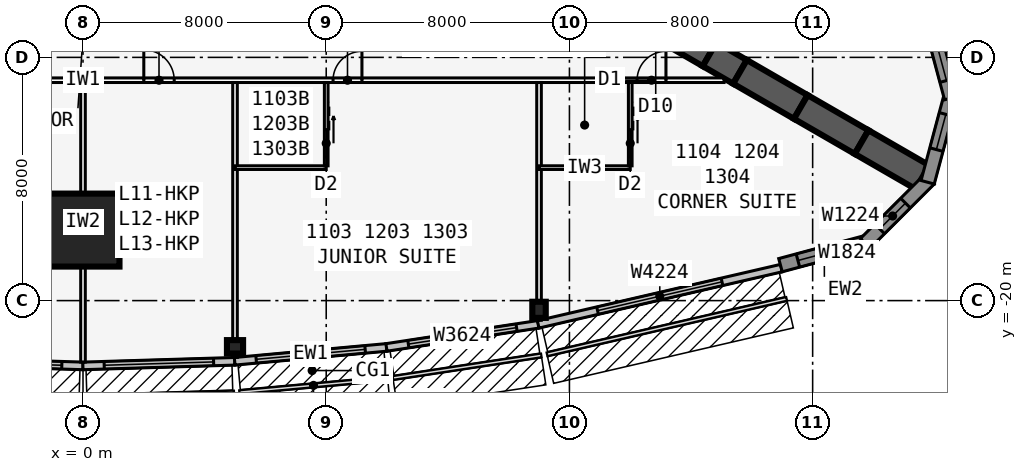
"""IFC4 building model, lengths in metres.
Left out: names, types, materials, properties, quantities, classifications, styles, units other than length and angle.
Written with IfcOpenShell. Run it as: python <this file> out.ifc"""

import sys

from ifc_helpers import new_model, si_unit, direction, frame, frame_2d, origin, origin_2d, place, context, subcontext, project, spatial, polyline, rectangle, i_section, outline, extrude, element, fill, save


model = new_model("IFC4")
c1 = context("Model", 3, precision=1e-05, world=origin(), true_north=direction((0.0, 1.0)))
c2 = subcontext(c1, "Body", "Model", "MODEL_VIEW")
j1 = project(units=[si_unit("LENGTHUNIT", "METRE"), si_unit("PLANEANGLEUNIT", "RADIAN")], contexts=[c1])
p1 = place(None, origin())
s1 = spatial("IfcSite", under=j1, at=p1, CompositionType="ELEMENT")
p2 = place(p1, origin())
s2 = spatial("IfcBuilding", under=s1, at=p2, CompositionType="ELEMENT")
p3 = place(p2, frame((0.0, 0.0, 48.9)))
s3 = spatial("IfcBuildingStorey", under=s2, at=p3, CompositionType="ELEMENT", Elevation=48.9)
p4 = place(p3, frame((16.5, -9.526, 0.0), z_axis=(0.0, 0.0, 1.0), x_axis=(0.866031398331, -0.499989616998, 0.0)))
e1 = element("IfcWall", 1, at=p4, inside=s3, PredefinedType="SHEAR", context=c2, shape_type="SweptSolid", body=[
    extrude(rectangle(XDim=4.746, YDim=0.9, at=frame_2d((2.373, 0.0))), origin(), (0.0, 0.0, 1.0), 3.4),
])
p5 = place(p4, frame((1.8, 0.0, 0.0)))
e2 = element("IfcOpeningElement", 2, at=p5, cuts=e1, PredefinedType="OPENING", context=c2, shape_type="SweptSolid", body=[
    extrude(rectangle(XDim=1.8, YDim=2.13, at=frame_2d((0.9, 1.065))), frame((0.0, 0.46, 0.0), z_axis=(0.0, -1.0, 0.0), x_axis=(1.0, 0.0, 0.0)), (0.0, 0.0, 1.0), 0.92),
])
p6 = place(p3, frame((20.61, -11.899, 0.0), z_axis=(0.0, 0.0, 1.0), x_axis=(0.866009537788, -0.500027479704, 0.0)))
e3 = element("IfcWall", 3, at=p6, inside=s3, PredefinedType="SHEAR", context=c2, shape_type="SweptSolid", body=[
    extrude(rectangle(XDim=1.155, YDim=0.9, at=frame_2d((0.577, 0.0))), origin(), (0.0, 0.0, 1.0), 3.4),
])
for number, where, z_axis, x_axis in (
    (4, (21.61, -12.477, 0.0), (0.0, 0.0, 1.0), (0.866, -0.5, 0.0)),
    (5, (23.61, -13.631, 0.0), (0.0, 0.0, 1.0), (0.866, -0.5, 0.0)),
    (6, (25.61, -14.786, 0.0), (0.0, 0.0, 1.0), (0.866, -0.5, 0.0)),
):
    element("IfcWall", number, at=place(p3, frame(where, z_axis=z_axis, x_axis=x_axis)), inside=s3, PredefinedType="SHEAR", context=c2, shape_type="SweptSolid", body=[
        extrude(rectangle(XDim=2.309, YDim=0.9, at=frame_2d((1.155, 0.0))), origin(), (0.0, 0.0, 1.0), 3.4),
    ])
for number, where, z_axis, x_axis in (
    (7, (5.0, -21.521, 0.0), (0.0, 0.0, 1.0), (0.0, -1.0, 0.0)),
    (8, (15.0, -20.303, 0.0), (0.0, 0.0, 1.0), (1.0, 0.0, 0.0)),
):
    element("IfcColumn", number, at=place(p3, frame(where, z_axis=z_axis, x_axis=x_axis)), inside=s3, PredefinedType="COLUMN", context=c2, shape_type="SweptSolid", body=[
        extrude(i_section(OverallWidth=0.442, OverallDepth=0.531, WebThickness=0.066, FlangeThickness=0.106, at=origin_2d()), origin(), (0.0, 0.0, 1.0), 3.4),
    ])
p7 = place(p3, frame((0.0, -17.68, 0.0), z_axis=(0.0, 0.0, 1.0), x_axis=(0.0, -1.0, 0.0)))
e9 = element("IfcColumn", 9, at=p7, inside=s3, PredefinedType="COLUMN", context=c2, shape_type="SweptSolid", body=[
    extrude(rectangle(XDim=2.4, YDim=2.4, at=origin_2d()), origin(), (0.0, 0.0, 1.0), 3.4),
])
p8 = place(p3, frame((-4.996, -21.996, 0.0), z_axis=(0.0, 0.0, 1.0), x_axis=(0.999537635046, -0.030405856769, 0.0)))
e10 = element("IfcWall", 10, at=p8, inside=s3, PredefinedType="STANDARD", context=c2, shape_type="SweptSolid", body=[
    extrude(rectangle(XDim=5.002, YDim=0.25, at=frame_2d((2.501, 0.0))), origin(), (0.0, 0.0, 1.0), 3.235),
])
p9 = place(p8, frame((0.701, 0.0, 0.45)))
e11 = element("IfcOpeningElement", 11, at=p9, cuts=e10, PredefinedType="OPENING", context=c2, shape_type="SweptSolid", body=[
    extrude(rectangle(XDim=3.6, YDim=2.4, at=frame_2d((1.8, 1.2))), frame((0.0, 0.135, 0.0), z_axis=(0.0, -1.0, 0.0), x_axis=(1.0, 0.0, 0.0)), (0.0, 0.0, 1.0), 0.27),
])
p10 = place(p3, frame((-0.004, -22.148, 0.0), z_axis=(0.0, 0.0, 1.0), x_axis=(0.999537635046, 0.030405856769, 0.0)))
e12 = element("IfcWall", 12, at=p10, inside=s3, PredefinedType="STANDARD", context=c2, shape_type="SweptSolid", body=[
    extrude(rectangle(XDim=5.002, YDim=0.25, at=frame_2d((2.501, 0.0))), origin(), (0.0, 0.0, 1.0), 3.235),
])
p11 = place(p10, frame((0.701, 0.0, 0.45)))
e13 = element("IfcOpeningElement", 13, at=p11, cuts=e12, PredefinedType="OPENING", context=c2, shape_type="SweptSolid", body=[
    extrude(rectangle(XDim=3.6, YDim=2.4, at=frame_2d((1.8, 1.2))), frame((0.0, 0.135, 0.0), z_axis=(0.0, -1.0, 0.0), x_axis=(1.0, 0.0, 0.0)), (0.0, 0.0, 1.0), 0.27),
])
p12 = place(p3, frame((4.989, -21.996, 0.0), z_axis=(0.0, 0.0, 1.0), x_axis=(0.995857256774, 0.090930325692, 0.0)))
e14 = element("IfcWall", 14, at=p12, inside=s3, PredefinedType="STANDARD", context=c2, shape_type="SweptSolid", body=[
    extrude(rectangle(XDim=5.021, YDim=0.25, at=frame_2d((2.51, 0.0))), origin(), (0.0, 0.0, 1.0), 3.235),
])
p13 = place(p12, frame((0.71, 0.0, 0.45)))
e15 = element("IfcOpeningElement", 15, at=p13, cuts=e14, PredefinedType="OPENING", context=c2, shape_type="SweptSolid", body=[
    extrude(rectangle(XDim=3.6, YDim=2.4, at=frame_2d((1.8, 1.2))), frame((0.0, 0.135, 0.0), z_axis=(0.0, -1.0, 0.0), x_axis=(1.0, 0.0, 0.0)), (0.0, 0.0, 1.0), 0.27),
])
p14 = place(p3, frame((9.981, -21.54, 0.0), z_axis=(0.0, 0.0, 1.0), x_axis=(0.988615403399, 0.150464561152, 0.0)))
e16 = element("IfcWall", 16, at=p14, inside=s3, PredefinedType="STANDARD", context=c2, shape_type="SweptSolid", body=[
    extrude(rectangle(XDim=5.058, YDim=0.25, at=frame_2d((2.529, 0.0))), origin(), (0.0, 0.0, 1.0), 3.235),
])
p15 = place(p14, frame((0.729, 0.0, 0.45)))
e17 = element("IfcOpeningElement", 17, at=p15, cuts=e16, PredefinedType="OPENING", context=c2, shape_type="SweptSolid", body=[
    extrude(rectangle(XDim=3.6, YDim=2.4, at=frame_2d((1.8, 1.2))), frame((0.0, 0.135, 0.0), z_axis=(0.0, -1.0, 0.0), x_axis=(1.0, 0.0, 0.0)), (0.0, 0.0, 1.0), 0.27),
])
p16 = place(p3, frame((14.972, -20.781, 0.0), z_axis=(0.0, 0.0, 1.0), x_axis=(0.974279327392, 0.225343720163, 0.0)))
e18 = element("IfcWall", 18, at=p16, inside=s3, PredefinedType="STANDARD", context=c2, shape_type="SweptSolid", body=[
    extrude(rectangle(XDim=8.211, YDim=0.25, at=frame_2d((4.105, 0.0))), origin(), (0.0, 0.0, 1.0), 3.235),
])
p17 = place(p16, frame((2.006, 0.0, 0.45)))
e19 = element("IfcOpeningElement", 19, at=p17, cuts=e18, PredefinedType="OPENING", context=c2, shape_type="SweptSolid", body=[
    extrude(rectangle(XDim=4.2, YDim=2.4, at=frame_2d((2.1, 1.2))), frame((0.0, 0.135, 0.0), z_axis=(0.0, -1.0, 0.0), x_axis=(1.0, 0.0, 0.0)), (0.0, 0.0, 1.0), 0.27),
])
p18 = place(p3, frame((22.942, -18.835, 0.0), z_axis=(0.0, 0.0, 1.0), x_axis=(0.965930548995, 0.258801419081, 0.0)))
e20 = element("IfcWall", 20, at=p18, inside=s3, PredefinedType="SOLIDWALL", context=c2, shape_type="SweptSolid", body=[
    extrude(rectangle(XDim=2.989, YDim=0.45, at=frame_2d((1.494, 0.0))), origin(), (0.0, 0.0, 1.0), 3.235),
])
p19 = place(p18, frame((0.594, 0.0, 0.45)))
e21 = element("IfcOpeningElement", 21, at=p19, cuts=e20, PredefinedType="OPENING", context=c2, shape_type="SweptSolid", body=[
    extrude(rectangle(XDim=1.8, YDim=2.4, at=frame_2d((0.9, 1.2))), frame((0.0, 0.235, 0.0), z_axis=(0.0, -1.0, 0.0), x_axis=(1.0, 0.0, 0.0)), (0.0, 0.0, 1.0), 0.47),
])
p20 = place(p3, frame((25.728, -18.12, 0.0), z_axis=(0.0, 0.0, 1.0), x_axis=(0.707025086683, 0.707188466253, 0.0)))
e22 = element("IfcWall", 22, at=p20, inside=s3, PredefinedType="SOLIDWALL", context=c2, shape_type="SweptSolid", body=[
    extrude(outline(polyline([(2.989, 0.225), (2.93, 0.225), (2.438, 0.093), (2.402, 0.225), (0.0, 0.225), (0.0, -0.225), (2.989, -0.225), (2.989, 0.225)])), origin(), (0.0, 0.0, 1.0), 3.235),
])
p21 = place(p20, frame((0.676, 0.0, 0.45)))
e23 = element("IfcOpeningElement", 23, at=p21, cuts=e22, PredefinedType="OPENING", context=c2, shape_type="SweptSolid", body=[
    extrude(rectangle(XDim=1.2, YDim=2.4, at=frame_2d((0.6, 1.2))), frame((0.0, 0.235, 0.0), z_axis=(0.0, -1.0, 0.0), x_axis=(1.0, 0.0, 0.0)), (0.0, 0.0, 1.0), 0.47),
])
p22 = place(p3, frame((27.783, -16.108, 0.0), z_axis=(0.0, 0.0, 1.0), x_axis=(0.258801419081, 0.965930548995, 0.0)))
e24 = element("IfcWall", 24, at=p22, inside=s3, PredefinedType="SOLIDWALL", context=c2, shape_type="SweptSolid", body=[
    extrude(outline(polyline([(2.989, 0.225), (0.586, 0.225), (0.551, 0.093), (0.06, 0.225), (0.0, 0.225), (0.0, -0.225), (2.989, -0.225), (2.989, 0.225)])), origin(), (0.0, 0.0, 1.0), 3.235),
])
p23 = place(p22, frame((1.113, 0.0, 0.45)))
e25 = element("IfcOpeningElement", 25, at=p23, cuts=e24, PredefinedType="OPENING", context=c2, shape_type="SweptSolid", body=[
    extrude(rectangle(XDim=1.2, YDim=2.4, at=frame_2d((0.6, 1.2))), frame((0.0, 0.235, 0.0), z_axis=(0.0, -1.0, 0.0), x_axis=(1.0, 0.0, 0.0)), (0.0, 0.0, 1.0), 0.47),
])
p24 = place(p3, frame((28.556, -13.337, 0.0), z_axis=(0.0, 0.0, 1.0), x_axis=(-0.258780998834, 0.965936019953, 0.0)))
e26 = element("IfcWall", 26, at=p24, inside=s3, PredefinedType="SOLIDWALL", context=c2, shape_type="SweptSolid", body=[
    extrude(rectangle(XDim=2.989, YDim=0.45, at=frame_2d((1.494, 0.0))), origin(), (0.0, 0.0, 1.0), 3.235),
])
p25 = place(p24, frame((0.594, 0.0, 0.45)))
e27 = element("IfcOpeningElement", 27, at=p25, cuts=e26, PredefinedType="OPENING", context=c2, shape_type="SweptSolid", body=[
    extrude(rectangle(XDim=1.8, YDim=2.4, at=frame_2d((0.9, 1.2))), frame((0.0, 0.235, 0.0), z_axis=(0.0, -1.0, 0.0), x_axis=(1.0, 0.0, 0.0)), (0.0, 0.0, 1.0), 0.47),
])
p26 = place(p3, frame((-21.086, -12.751, 0.0), z_axis=(0.0, 0.0, 1.0), x_axis=(1.0, 0.0, 0.0)))
e28 = element("IfcWall", 28, at=p26, inside=s3, PredefinedType="PARTITIONING", context=c2, shape_type="SweptSolid", body=[
    extrude(rectangle(XDim=42.172, YDim=0.15, at=frame_2d((21.086, 0.0))), origin(), (0.0, 0.0, 1.0), 3.235),
])
p27 = place(p26, frame((2.338, 0.0, 0.0)))
e29 = element("IfcOpeningElement", 29, at=p27, cuts=e28, PredefinedType="OPENING", context=c2, shape_type="SweptSolid", body=[
    extrude(rectangle(XDim=0.95, YDim=2.13, at=frame_2d((0.475, 1.065))), frame((0.0, 0.085, 0.0), z_axis=(0.0, -1.0, 0.0), x_axis=(1.0, 0.0, 0.0)), (0.0, 0.0, 1.0), 0.17),
])
p28 = place(p26, frame((14.311, 0.0, 0.0)))
e30 = element("IfcOpeningElement", 30, at=p28, cuts=e28, PredefinedType="OPENING", context=c2, shape_type="SweptSolid", body=[
    extrude(rectangle(XDim=0.95, YDim=2.13, at=frame_2d((0.475, 1.065))), frame((0.0, 0.085, 0.0), z_axis=(0.0, -1.0, 0.0), x_axis=(1.0, 0.0, 0.0)), (0.0, 0.0, 1.0), 0.17),
])
p29 = place(p26, frame((23.086, 0.0, 0.0)))
e31 = element("IfcOpeningElement", 31, at=p29, cuts=e28, PredefinedType="OPENING", context=c2, shape_type="SweptSolid", body=[
    extrude(rectangle(XDim=1.0, YDim=2.13, at=frame_2d((0.5, 1.065))), frame((0.0, 0.085, 0.0), z_axis=(0.0, -1.0, 0.0), x_axis=(1.0, 0.0, 0.0)), (0.0, 0.0, 1.0), 0.17),
])
p30 = place(p26, frame((29.311, 0.0, 0.0)))
e32 = element("IfcOpeningElement", 32, at=p30, cuts=e28, PredefinedType="OPENING", context=c2, shape_type="SweptSolid", body=[
    extrude(rectangle(XDim=0.95, YDim=2.13, at=frame_2d((0.475, 1.065))), frame((0.0, 0.085, 0.0), z_axis=(0.0, -1.0, 0.0), x_axis=(1.0, 0.0, 0.0)), (0.0, 0.0, 1.0), 0.17),
])
p31 = place(p26, frame((39.311, 0.0, 0.0)))
e33 = element("IfcOpeningElement", 33, at=p31, cuts=e28, PredefinedType="OPENING", context=c2, shape_type="SweptSolid", body=[
    extrude(rectangle(XDim=0.95, YDim=2.13, at=frame_2d((0.475, 1.065))), frame((0.0, 0.085, 0.0), z_axis=(0.0, -1.0, 0.0), x_axis=(1.0, 0.0, 0.0)), (0.0, 0.0, 1.0), 0.17),
])
p32 = place(p3, frame((0.0, -12.826, 0.0), z_axis=(0.0, 0.0, 1.0), x_axis=(0.0, -1.0, 0.0)))
e34 = element("IfcWall", 34, at=p32, inside=s3, PredefinedType="PARTITIONING", context=c2, shape_type="SweptSolid", body=[
    extrude(rectangle(XDim=9.196, YDim=0.15, at=frame_2d((4.598, 0.0))), origin(), (0.0, 0.0, 1.0), 2.389),
])
p33 = place(p3, frame((5.0, -12.826, 0.0), z_axis=(0.0, 0.0, 1.0), x_axis=(0.0, -1.0, 0.0)))
e35 = element("IfcWall", 35, at=p33, inside=s3, PredefinedType="PARTITIONING", context=c2, shape_type="SweptSolid", body=[
    extrude(rectangle(XDim=9.043, YDim=0.15, at=frame_2d((4.521, 0.0))), origin(), (0.0, 0.0, 1.0), 2.389),
])
p34 = place(p3, frame((15.0, -12.826, 0.0), z_axis=(0.0, 0.0, 1.0), x_axis=(0.0, -1.0, 0.0)))
e36 = element("IfcWall", 36, at=p34, inside=s3, PredefinedType="PARTITIONING", context=c2, shape_type="SweptSolid", body=[
    extrude(rectangle(XDim=7.82, YDim=0.15, at=frame_2d((3.91, 0.0))), origin(), (0.0, 0.0, 1.0), 2.389),
])
p35 = place(p3, frame((5.0, -15.626, 0.0), z_axis=(0.0, 0.0, 1.0), x_axis=(1.0, 0.0, 0.0)))
e37 = element("IfcWall", 37, at=p35, inside=s3, PredefinedType="PLUMBINGWALL", context=c2, shape_type="SweptSolid", body=[
    extrude(rectangle(XDim=3.0, YDim=0.12, at=frame_2d((1.5, 0.0))), origin(), (0.0, 0.0, 1.0), 3.235),
])
p36 = place(p3, frame((8.0, -12.826, 0.0), z_axis=(0.0, 0.0, 1.0), x_axis=(0.0, -1.0, 0.0)))
e38 = element("IfcWall", 38, at=p36, inside=s3, PredefinedType="PLUMBINGWALL", context=c2, shape_type="SweptSolid", body=[
    extrude(rectangle(XDim=2.74, YDim=0.12, at=frame_2d((1.37, 0.0))), origin(), (0.0, 0.0, 1.0), 3.235),
])
p37 = place(p36, frame((1.55, 0.0, 0.0)))
e39 = element("IfcOpeningElement", 39, at=p37, cuts=e38, PredefinedType="OPENING", context=c2, shape_type="SweptSolid", body=[
    extrude(rectangle(XDim=0.9, YDim=2.13, at=frame_2d((0.45, 1.065))), frame((0.0, 0.07, 0.0), z_axis=(0.0, -1.0, 0.0), x_axis=(1.0, 0.0, 0.0)), (0.0, 0.0, 1.0), 0.14),
])
p38 = place(p3, frame((15.0, -15.626, 0.0), z_axis=(0.0, 0.0, 1.0), x_axis=(1.0, 0.0, 0.0)))
e40 = element("IfcWall", 40, at=p38, inside=s3, PredefinedType="PLUMBINGWALL", context=c2, shape_type="SweptSolid", body=[
    extrude(rectangle(XDim=3.0, YDim=0.12, at=frame_2d((1.5, 0.0))), origin(), (0.0, 0.0, 1.0), 3.235),
])
p39 = place(p3, frame((18.0, -12.826, 0.0), z_axis=(0.0, 0.0, 1.0), x_axis=(0.0, -1.0, 0.0)))
e41 = element("IfcWall", 41, at=p39, inside=s3, PredefinedType="PLUMBINGWALL", context=c2, shape_type="SweptSolid", body=[
    extrude(rectangle(XDim=2.74, YDim=0.12, at=frame_2d((1.37, 0.0))), origin(), (0.0, 0.0, 1.0), 3.235),
])
p40 = place(p39, frame((1.55, 0.0, 0.0)))
e42 = element("IfcOpeningElement", 42, at=p40, cuts=e41, PredefinedType="OPENING", context=c2, shape_type="SweptSolid", body=[
    extrude(rectangle(XDim=0.9, YDim=2.13, at=frame_2d((0.45, 1.065))), frame((0.0, 0.07, 0.0), z_axis=(0.0, -1.0, 0.0), x_axis=(1.0, 0.0, 0.0)), (0.0, 0.0, 1.0), 0.14),
])
p41 = place(p9, origin())
e43 = element("IfcWindow", 43, at=p41, inside=s3, PartitioningType="SINGLE_PANEL", PredefinedType="WINDOW", context=c2, shape_type="SweptSolid", body=[
    extrude(rectangle(XDim=3.6, YDim=2.4, at=frame_2d((1.8, 1.2))), frame((0.0, 0.03, 0.0), z_axis=(0.0, -1.0, 0.0), x_axis=(1.0, 0.0, 0.0)), (0.0, 0.0, 1.0), 0.06),
])
fill(e11, e43)
p42 = place(p11, origin())
e44 = element("IfcWindow", 44, at=p42, inside=s3, PartitioningType="SINGLE_PANEL", PredefinedType="WINDOW", context=c2, shape_type="SweptSolid", body=[
    extrude(rectangle(XDim=3.6, YDim=2.4, at=frame_2d((1.8, 1.2))), frame((0.0, 0.03, 0.0), z_axis=(0.0, -1.0, 0.0), x_axis=(1.0, 0.0, 0.0)), (0.0, 0.0, 1.0), 0.06),
])
fill(e13, e44)
p43 = place(p13, origin())
e45 = element("IfcWindow", 45, at=p43, inside=s3, PartitioningType="SINGLE_PANEL", PredefinedType="WINDOW", context=c2, shape_type="SweptSolid", body=[
    extrude(rectangle(XDim=3.6, YDim=2.4, at=frame_2d((1.8, 1.2))), frame((0.0, 0.03, 0.0), z_axis=(0.0, -1.0, 0.0), x_axis=(1.0, 0.0, 0.0)), (0.0, 0.0, 1.0), 0.06),
])
fill(e15, e45)
p44 = place(p15, origin())
e46 = element("IfcWindow", 46, at=p44, inside=s3, PartitioningType="SINGLE_PANEL", PredefinedType="WINDOW", context=c2, shape_type="SweptSolid", body=[
    extrude(rectangle(XDim=3.6, YDim=2.4, at=frame_2d((1.8, 1.2))), frame((0.0, 0.03, 0.0), z_axis=(0.0, -1.0, 0.0), x_axis=(1.0, 0.0, 0.0)), (0.0, 0.0, 1.0), 0.06),
])
fill(e17, e46)
p45 = place(p17, origin())
e47 = element("IfcWindow", 47, at=p45, inside=s3, PartitioningType="SINGLE_PANEL", PredefinedType="WINDOW", context=c2, shape_type="SweptSolid", body=[
    extrude(rectangle(XDim=4.2, YDim=2.4, at=frame_2d((2.1, 1.2))), frame((0.0, 0.03, 0.0), z_axis=(0.0, -1.0, 0.0), x_axis=(1.0, 0.0, 0.0)), (0.0, 0.0, 1.0), 0.06),
])
fill(e19, e47)
p46 = place(p19, origin())
e48 = element("IfcWindow", 48, at=p46, inside=s3, PartitioningType="SINGLE_PANEL", PredefinedType="WINDOW", context=c2, shape_type="SweptSolid", body=[
    extrude(rectangle(XDim=1.8, YDim=2.4, at=frame_2d((0.9, 1.2))), frame((0.0, 0.03, 0.0), z_axis=(0.0, -1.0, 0.0), x_axis=(1.0, 0.0, 0.0)), (0.0, 0.0, 1.0), 0.06),
])
fill(e21, e48)
p47 = place(p21, origin())
e49 = element("IfcWindow", 49, at=p47, inside=s3, PartitioningType="SINGLE_PANEL", PredefinedType="WINDOW", context=c2, shape_type="SweptSolid", body=[
    extrude(rectangle(XDim=1.2, YDim=2.4, at=frame_2d((0.6, 1.2))), frame((0.0, 0.03, 0.0), z_axis=(0.0, -1.0, 0.0), x_axis=(1.0, 0.0, 0.0)), (0.0, 0.0, 1.0), 0.06),
])
fill(e23, e49)
p48 = place(p23, origin())
e50 = element("IfcWindow", 50, at=p48, inside=s3, PartitioningType="SINGLE_PANEL", PredefinedType="WINDOW", context=c2, shape_type="SweptSolid", body=[
    extrude(rectangle(XDim=1.2, YDim=2.4, at=frame_2d((0.6, 1.2))), frame((0.0, 0.03, 0.0), z_axis=(0.0, -1.0, 0.0), x_axis=(1.0, 0.0, 0.0)), (0.0, 0.0, 1.0), 0.06),
])
fill(e25, e50)
p49 = place(p25, origin())
e51 = element("IfcWindow", 51, at=p49, inside=s3, PartitioningType="SINGLE_PANEL", PredefinedType="WINDOW", context=c2, shape_type="SweptSolid", body=[
    extrude(rectangle(XDim=1.8, YDim=2.4, at=frame_2d((0.9, 1.2))), frame((0.0, 0.03, 0.0), z_axis=(0.0, -1.0, 0.0), x_axis=(1.0, 0.0, 0.0)), (0.0, 0.0, 1.0), 0.06),
])
fill(e27, e51)
p50 = place(p29, origin())
e52 = element("IfcDoor", 52, at=p50, inside=s3, OperationType="SINGLE_SWING_LEFT", PredefinedType="DOOR", context=c2, shape_type="SweptSolid", body=[
    extrude(rectangle(XDim=1.0, YDim=2.13, at=frame_2d((0.5, 1.065))), frame((0.0, 0.025, 0.0), z_axis=(0.0, -1.0, 0.0), x_axis=(1.0, 0.0, 0.0)), (0.0, 0.0, 1.0), 0.05),
])
fill(e31, e52)
p51 = place(p37, origin())
e53 = element("IfcDoor", 53, at=p51, inside=s3, OperationType="SLIDING_TO_LEFT", PredefinedType="DOOR", context=c2, shape_type="SweptSolid", body=[
    extrude(rectangle(XDim=0.9, YDim=2.13, at=frame_2d((0.45, 1.065))), frame((0.0, 0.025, 0.0), z_axis=(0.0, -1.0, 0.0), x_axis=(1.0, 0.0, 0.0)), (0.0, 0.0, 1.0), 0.05),
])
fill(e39, e53)
p52 = place(p30, origin())
e54 = element("IfcDoor", 54, at=p52, inside=s3, OperationType="SINGLE_SWING_RIGHT", PredefinedType="DOOR", context=c2, shape_type="SweptSolid", body=[
    extrude(rectangle(XDim=0.95, YDim=2.13, at=frame_2d((0.475, 1.065))), frame((0.0, 0.025, 0.0), z_axis=(0.0, -1.0, 0.0), x_axis=(1.0, 0.0, 0.0)), (0.0, 0.0, 1.0), 0.05),
])
fill(e32, e54)
p53 = place(p40, origin())
e55 = element("IfcDoor", 55, at=p53, inside=s3, OperationType="SLIDING_TO_LEFT", PredefinedType="DOOR", context=c2, shape_type="SweptSolid", body=[
    extrude(rectangle(XDim=0.9, YDim=2.13, at=frame_2d((0.45, 1.065))), frame((0.0, 0.025, 0.0), z_axis=(0.0, -1.0, 0.0), x_axis=(1.0, 0.0, 0.0)), (0.0, 0.0, 1.0), 0.05),
])
fill(e42, e55)
p54 = place(p31, origin())
e56 = element("IfcDoor", 56, at=p54, inside=s3, OperationType="SINGLE_SWING_RIGHT", PredefinedType="DOOR", context=c2, shape_type="SweptSolid", body=[
    extrude(rectangle(XDim=0.95, YDim=2.13, at=frame_2d((0.475, 1.065))), frame((0.0, 0.025, 0.0), z_axis=(0.0, -1.0, 0.0), x_axis=(1.0, 0.0, 0.0)), (0.0, 0.0, 1.0), 0.05),
])
fill(e33, e56)
save(model, sys.argv[1])
